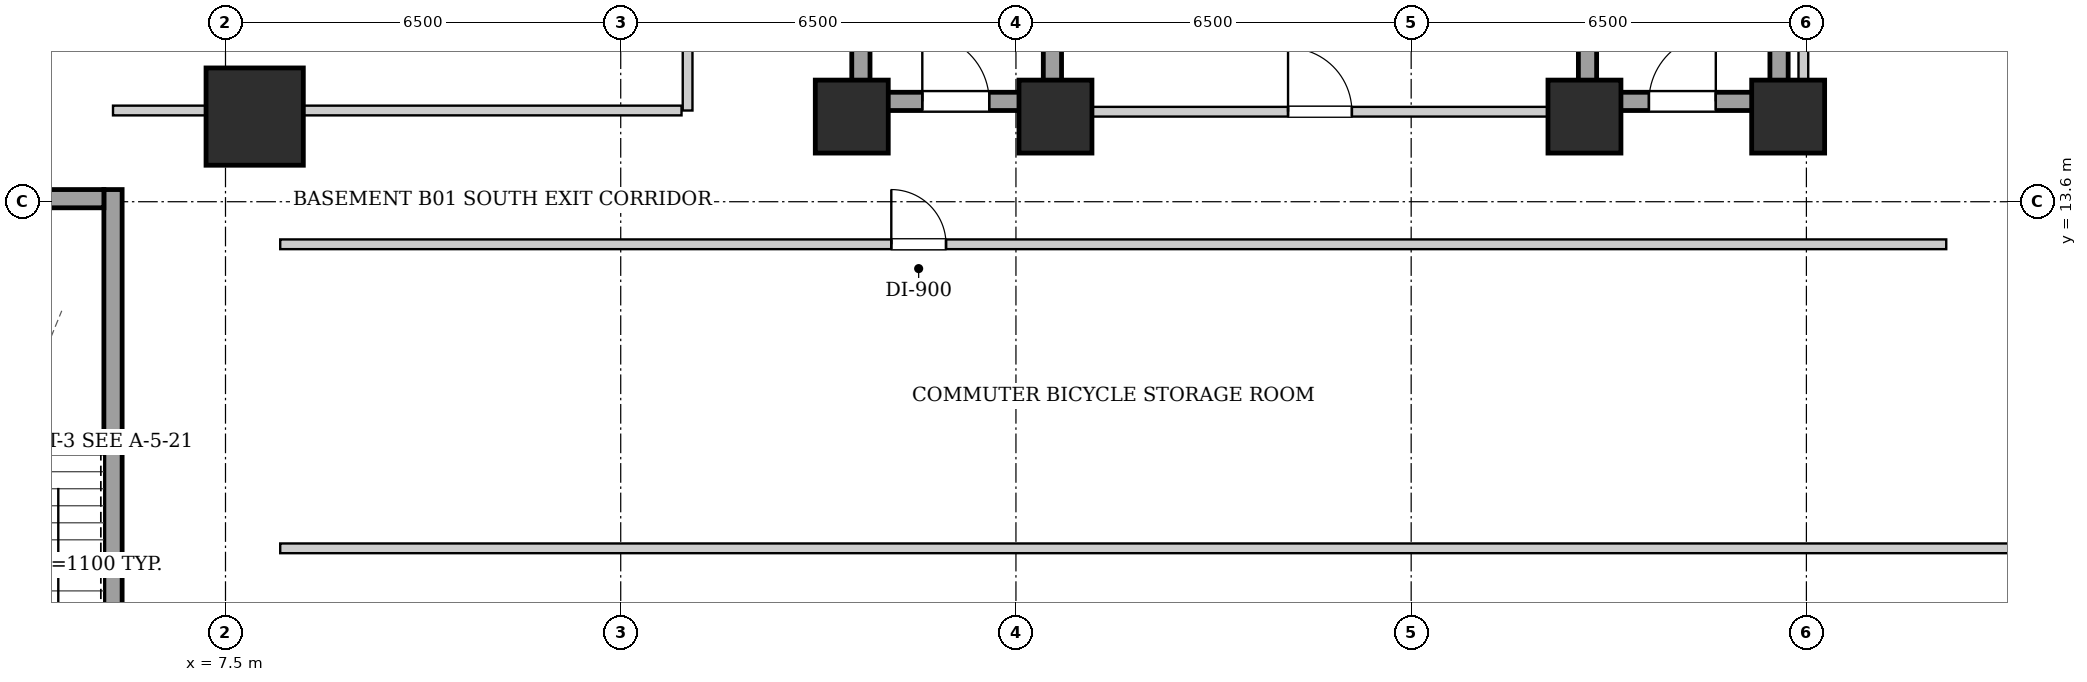
"""IFC4 building model, lengths in metres.
Left out: names, types, materials, properties, quantities, classifications, styles, units other than length and angle.
Written with IfcOpenShell. Run it as: python <this file> out.ifc"""

import sys

from ifc_helpers import new_model, si_unit, direction, frame, frame_2d, origin, origin_2d, place, context, subcontext, project, spatial, rectangle, extrude, element, fill, save


model = new_model("IFC4")
c1 = context("Model", 3, precision=1e-05, world=origin(), true_north=direction((0.0, 1.0)))
c2 = subcontext(c1, "Body", "Model", "MODEL_VIEW")
j1 = project(units=[si_unit("LENGTHUNIT", "METRE"), si_unit("PLANEANGLEUNIT", "RADIAN")], contexts=[c1])
p1 = place(None, origin())
s1 = spatial("IfcSite", under=j1, at=p1, CompositionType="ELEMENT")
p2 = place(p1, origin())
s2 = spatial("IfcBuilding", under=s1, at=p2, CompositionType="ELEMENT")
p3 = place(p2, frame((0.0, 0.0, -4.8)))
s3 = spatial("IfcBuildingStorey", under=s2, at=p3, CompositionType="ELEMENT", Elevation=-4.8)
p4 = place(p3, frame((7.98, 15.0, 0.0), z_axis=(0.0, 0.0, 1.0), x_axis=(1.0, 0.0, 0.0)))
e1 = element("IfcColumn", 1, at=p4, inside=s3, PredefinedType="COLUMN", context=c2, shape_type="SweptSolid", body=[
    extrude(rectangle(XDim=1.6, YDim=1.6, at=origin_2d()), origin(), (0.0, 0.0, 1.0), 4.8),
])
for number, where, z_axis, x_axis in (
    (2, (17.8, 15.0, 0.0), (0.0, 0.0, 1.0), (1.0, 0.0, 0.0)),
    (3, (21.15, 15.0, 0.0), (0.0, 0.0, 1.0), (1.0, 0.0, 0.0)),
    (4, (29.85, 15.0, 0.0), (0.0, 0.0, 1.0), (1.0, 0.0, 0.0)),
    (5, (33.2, 15.0, 0.0), (0.0, 0.0, 1.0), (1.0, 0.0, 0.0)),
):
    element("IfcColumn", number, at=place(p3, frame(where, z_axis=z_axis, x_axis=x_axis)), inside=s3, PredefinedType="COLUMN", context=c2, shape_type="SweptSolid", body=[
        extrude(rectangle(XDim=1.2, YDim=1.2, at=origin_2d()), origin(), (0.0, 0.0, 1.0), 4.8),
    ])
for number, where, z_axis, x_axis in (
    (6, (17.95, 15.1, 0.0), (0.0, 0.0, 1.0), (0.0, 1.0, 0.0)),
    (7, (21.1, 15.1, 0.0), (0.0, 0.0, 1.0), (0.0, 1.0, 0.0)),
):
    element("IfcWall", number, at=place(p3, frame(where, z_axis=z_axis, x_axis=x_axis)), inside=s3, PredefinedType="SHEAR", context=c2, shape_type="SweptSolid", body=[
        extrude(rectangle(XDim=9.0, YDim=0.3, at=frame_2d((4.5, 0.0))), origin(), (0.0, 0.0, 1.0), 4.48),
    ])
p5 = place(p3, frame((18.1, 15.25, 0.0), z_axis=(0.0, 0.0, 1.0), x_axis=(1.0, 0.0, 0.0)))
e8 = element("IfcWall", 8, at=p5, inside=s3, PredefinedType="SHEAR", context=c2, shape_type="SweptSolid", body=[
    extrude(rectangle(XDim=2.85, YDim=0.3, at=frame_2d((1.425, 0.0))), origin(), (0.0, 0.0, 1.0), 4.48),
])
p6 = place(p5, frame((0.86, 0.0, 0.0)))
e9 = element("IfcOpeningElement", 9, at=p6, cuts=e8, PredefinedType="OPENING", context=c2, shape_type="SweptSolid", body=[
    extrude(rectangle(XDim=1.1, YDim=2.05, at=frame_2d((0.55, 1.025))), frame((0.0, 0.16, 0.0), z_axis=(0.0, -1.0, 0.0), x_axis=(1.0, 0.0, 0.0)), (0.0, 0.0, 1.0), 0.32),
])
for number, where, z_axis, x_axis in (
    (10, (29.9, 15.1, 0.0), (0.0, 0.0, 1.0), (0.0, 1.0, 0.0)),
    (11, (33.05, 15.1, 0.0), (0.0, 0.0, 1.0), (0.0, 1.0, 0.0)),
):
    element("IfcWall", number, at=place(p3, frame(where, z_axis=z_axis, x_axis=x_axis)), inside=s3, PredefinedType="SHEAR", context=c2, shape_type="SweptSolid", body=[
        extrude(rectangle(XDim=9.0, YDim=0.3, at=frame_2d((4.5, 0.0))), origin(), (0.0, 0.0, 1.0), 4.48),
    ])
p7 = place(p3, frame((30.05, 15.25, 0.0), z_axis=(0.0, 0.0, 1.0), x_axis=(1.0, 0.0, 0.0)))
e12 = element("IfcWall", 12, at=p7, inside=s3, PredefinedType="SHEAR", context=c2, shape_type="SweptSolid", body=[
    extrude(rectangle(XDim=2.85, YDim=0.3, at=frame_2d((1.425, 0.0))), origin(), (0.0, 0.0, 1.0), 4.48),
])
p8 = place(p7, frame((0.86, 0.0, 0.0)))
e13 = element("IfcOpeningElement", 13, at=p8, cuts=e12, PredefinedType="OPENING", context=c2, shape_type="SweptSolid", body=[
    extrude(rectangle(XDim=1.1, YDim=2.05, at=frame_2d((0.55, 1.025))), frame((0.0, 0.16, 0.0), z_axis=(0.0, -1.0, 0.0), x_axis=(1.0, 0.0, 0.0)), (0.0, 0.0, 1.0), 0.32),
])
p9 = place(p3, frame((5.65, 4.0, 0.0), z_axis=(0.0, 0.0, 1.0), x_axis=(0.0, 1.0, 0.0)))
e14 = element("IfcWall", 14, at=p9, inside=s3, PredefinedType="SHEAR", context=c2, shape_type="SweptSolid", body=[
    extrude(rectangle(XDim=9.8, YDim=0.3, at=frame_2d((4.9, 0.0))), origin(), (0.0, 0.0, 1.0), 4.48),
])
p10 = place(p3, frame((2.35, 13.65, 0.0), z_axis=(0.0, 0.0, 1.0), x_axis=(1.0, 0.0, 0.0)))
e15 = element("IfcWall", 15, at=p10, inside=s3, PredefinedType="SHEAR", context=c2, shape_type="SweptSolid", body=[
    extrude(rectangle(XDim=3.15, YDim=0.3, at=frame_2d((1.575, 0.0))), origin(), (0.0, 0.0, 1.0), 4.48),
])
p11 = place(p3, frame((21.25, 15.08, 0.0), z_axis=(0.0, 0.0, 1.0), x_axis=(1.0, 0.0, 0.0)))
e16 = element("IfcWall", 16, at=p11, inside=s3, PredefinedType="PARTITIONING", context=c2, shape_type="SweptSolid", body=[
    extrude(rectangle(XDim=8.5, YDim=0.16, at=frame_2d((4.25, 0.0))), origin(), (0.0, 0.0, 1.0), 4.48),
])
p12 = place(p11, frame((3.725, 0.0, 0.0)))
e17 = element("IfcOpeningElement", 17, at=p12, cuts=e16, PredefinedType="OPENING", context=c2, shape_type="SweptSolid", body=[
    extrude(rectangle(XDim=1.05, YDim=2.05, at=frame_2d((0.525, 1.025))), frame((0.0, 0.09, 0.0), z_axis=(0.0, -1.0, 0.0), x_axis=(1.0, 0.0, 0.0)), (0.0, 0.0, 1.0), 0.18),
])
p13 = place(p3, frame((15.1, 15.1, 0.0), z_axis=(0.0, 0.0, 1.0), x_axis=(0.0, 1.0, 0.0)))
e18 = element("IfcWall", 18, at=p13, inside=s3, PredefinedType="PARTITIONING", context=c2, shape_type="SweptSolid", body=[
    extrude(rectangle(XDim=13.8, YDim=0.16, at=frame_2d((6.9, 0.0))), origin(), (0.0, 0.0, 1.0), 4.48),
])
p14 = place(p13, frame((6.475, 0.0, 0.0)))
e19 = element("IfcOpeningElement", 19, at=p14, cuts=e18, PredefinedType="OPENING", context=c2, shape_type="SweptSolid", body=[
    extrude(rectangle(XDim=1.05, YDim=2.05, at=frame_2d((0.525, 1.025))), frame((0.0, 0.09, 0.0), z_axis=(0.0, -1.0, 0.0), x_axis=(1.0, 0.0, 0.0)), (0.0, 0.0, 1.0), 0.18),
])
p15 = place(p3, frame((5.65, 15.1, 0.0), z_axis=(0.0, 0.0, 1.0), x_axis=(1.0, 0.0, 0.0)))
e20 = element("IfcWall", 20, at=p15, inside=s3, PredefinedType="PARTITIONING", context=c2, shape_type="SweptSolid", body=[
    extrude(rectangle(XDim=9.35, YDim=0.16, at=frame_2d((4.675, 0.0))), origin(), (0.0, 0.0, 1.0), 3.565),
])
p16 = place(p3, frame((8.4, 12.9, 0.0), z_axis=(0.0, 0.0, 1.0), x_axis=(1.0, 0.0, 0.0)))
e21 = element("IfcWall", 21, at=p16, inside=s3, PredefinedType="PARTITIONING", context=c2, shape_type="SweptSolid", body=[
    extrude(rectangle(XDim=27.4, YDim=0.16, at=frame_2d((13.7, 0.0))), origin(), (0.0, 0.0, 1.0), 4.48),
])
p17 = place(p16, frame((10.05, 0.0, 0.0)))
e22 = element("IfcOpeningElement", 22, at=p17, cuts=e21, PredefinedType="OPENING", context=c2, shape_type="SweptSolid", body=[
    extrude(rectangle(XDim=0.9, YDim=2.05, at=frame_2d((0.45, 1.025))), frame((0.0, 0.09, 0.0), z_axis=(0.0, -1.0, 0.0), x_axis=(1.0, 0.0, 0.0)), (0.0, 0.0, 1.0), 0.18),
])
p18 = place(p3, frame((8.4, 7.9, 0.0), z_axis=(0.0, 0.0, 1.0), x_axis=(1.0, 0.0, 0.0)))
e23 = element("IfcWall", 23, at=p18, inside=s3, PredefinedType="PARTITIONING", context=c2, shape_type="SweptSolid", body=[
    extrude(rectangle(XDim=37.1, YDim=0.16, at=frame_2d((18.55, 0.0))), origin(), (0.0, 0.0, 1.0), 4.48),
])
p19 = place(p18, frame((30.975, 0.0, 0.0)))
e24 = element("IfcOpeningElement", 24, at=p19, cuts=e23, PredefinedType="OPENING", context=c2, shape_type="SweptSolid", body=[
    extrude(rectangle(XDim=1.05, YDim=2.05, at=frame_2d((0.525, 1.025))), frame((0.0, 0.09, 0.0), z_axis=(0.0, -1.0, 0.0), x_axis=(1.0, 0.0, 0.0)), (0.0, 0.0, 1.0), 0.18),
])
p20 = place(p3, frame((33.45, 15.1, 0.0), z_axis=(0.0, 0.0, 1.0), x_axis=(0.0, 1.0, 0.0)))
e25 = element("IfcWall", 25, at=p20, inside=s3, PredefinedType="PARTITIONING", context=c2, shape_type="SweptSolid", body=[
    extrude(rectangle(XDim=13.78, YDim=0.16, at=frame_2d((6.89, 0.0))), origin(), (0.0, 0.0, 1.0), 4.48),
])
p21 = place(p6, origin())
e26 = element("IfcDoor", 26, at=p21, inside=s3, OperationType="SINGLE_SWING_LEFT", PredefinedType="DOOR", context=c2, shape_type="SweptSolid", body=[
    extrude(rectangle(XDim=1.1, YDim=2.05, at=frame_2d((0.55, 1.025))), frame((0.0, 0.025, 0.0), z_axis=(0.0, -1.0, 0.0), x_axis=(1.0, 0.0, 0.0)), (0.0, 0.0, 1.0), 0.05),
])
fill(e9, e26)
p22 = place(p8, origin())
e27 = element("IfcDoor", 27, at=p22, inside=s3, OperationType="SINGLE_SWING_RIGHT", PredefinedType="DOOR", context=c2, shape_type="SweptSolid", body=[
    extrude(rectangle(XDim=1.1, YDim=2.05, at=frame_2d((0.55, 1.025))), frame((0.0, 0.025, 0.0), z_axis=(0.0, -1.0, 0.0), x_axis=(1.0, 0.0, 0.0)), (0.0, 0.0, 1.0), 0.05),
])
fill(e13, e27)
p23 = place(p12, origin())
e28 = element("IfcDoor", 28, at=p23, inside=s3, OperationType="SINGLE_SWING_LEFT", PredefinedType="DOOR", context=c2, shape_type="SweptSolid", body=[
    extrude(rectangle(XDim=1.05, YDim=2.05, at=frame_2d((0.525, 1.025))), frame((0.0, 0.025, 0.0), z_axis=(0.0, -1.0, 0.0), x_axis=(1.0, 0.0, 0.0)), (0.0, 0.0, 1.0), 0.05),
])
fill(e17, e28)
p24 = place(p17, origin())
e29 = element("IfcDoor", 29, at=p24, inside=s3, OperationType="SINGLE_SWING_LEFT", PredefinedType="DOOR", context=c2, shape_type="SweptSolid", body=[
    extrude(rectangle(XDim=0.9, YDim=2.05, at=frame_2d((0.45, 1.025))), frame((0.0, 0.025, 0.0), z_axis=(0.0, -1.0, 0.0), x_axis=(1.0, 0.0, 0.0)), (0.0, 0.0, 1.0), 0.05),
])
fill(e22, e29)
save(model, sys.argv[1])
